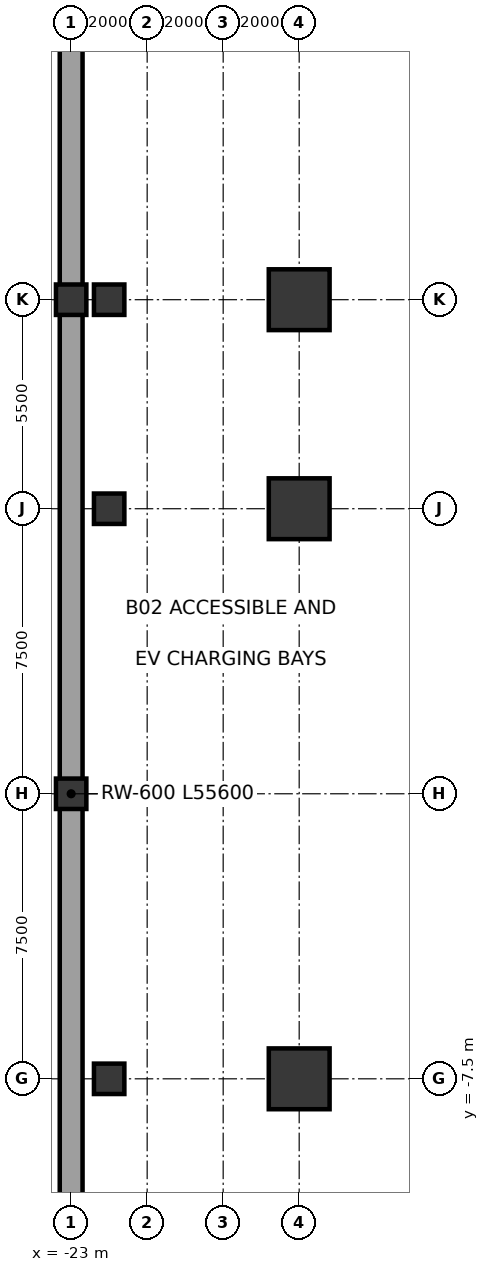
"""IFC4 building model, lengths in metres.
Left out: names, types, materials, properties, quantities, classifications, styles, units other than length and angle.
Written with IfcOpenShell. Run it as: python <this file> out.ifc"""

import sys

from ifc_helpers import new_model, si_unit, direction, frame, frame_2d, origin, origin_2d, place, context, subcontext, project, spatial, rectangle, extrude, element, save


model = new_model("IFC4")
c1 = context("Model", 3, precision=1e-05, world=origin(), true_north=direction((0.0, 1.0)))
c2 = subcontext(c1, "Body", "Model", "MODEL_VIEW")
j1 = project(units=[si_unit("LENGTHUNIT", "METRE"), si_unit("PLANEANGLEUNIT", "RADIAN")], contexts=[c1])
p1 = place(None, origin())
s1 = spatial("IfcSite", under=j1, at=p1, CompositionType="ELEMENT")
p2 = place(p1, origin())
s2 = spatial("IfcBuilding", under=s1, at=p2, CompositionType="ELEMENT")
p3 = place(p2, frame((0.0, 0.0, -7.2)))
s3 = spatial("IfcBuildingStorey", under=s2, at=p3, CompositionType="ELEMENT", Elevation=-7.2)
p4 = place(p3, frame((-23.0, 27.8, 0.0), z_axis=(0.0, 0.0, 1.0), x_axis=(0.0, -1.0, 0.0)))
e1 = element("IfcWall", 1, at=p4, inside=s3, PredefinedType="USERDEFINED", context=c2, shape_type="SweptSolid", body=[
    extrude(rectangle(XDim=55.6, YDim=0.6, at=frame_2d((27.8, 0.0))), origin(), (0.0, 0.0, 1.0), 3.6),
])
for number, where, z_axis, x_axis in (
    (2, (-17.0, 13.0, 0.0), (0.0, 0.0, 1.0), (1.0, 0.0, 0.0)),
    (3, (-17.0, 7.5, 0.0), (0.0, 0.0, 1.0), (1.0, 0.0, 0.0)),
    (4, (-17.0, -7.5, 0.0), (0.0, 0.0, 1.0), (1.0, 0.0, 0.0)),
):
    element("IfcColumn", number, at=place(p3, frame(where, z_axis=z_axis, x_axis=x_axis)), inside=s3, PredefinedType="USERDEFINED", context=c2, shape_type="SweptSolid", body=[
        extrude(rectangle(XDim=1.6, YDim=1.6, at=origin_2d()), origin(), (0.0, 0.0, 1.0), 3.6),
    ])
for number, where, z_axis, x_axis in (
    (5, (-23.0, 0.0, 0.0), (0.0, 0.0, 1.0), (1.0, 0.0, 0.0)),
    (6, (-23.0, 13.0, 0.0), (0.0, 0.0, 1.0), (1.0, 0.0, 0.0)),
    (7, (-22.0, -7.5, 0.0), (0.0, 0.0, 1.0), (1.0, 0.0, 0.0)),
    (8, (-22.0, 7.5, 0.0), (0.0, 0.0, 1.0), (1.0, 0.0, 0.0)),
    (9, (-22.0, 13.0, 0.0), (0.0, 0.0, 1.0), (1.0, 0.0, 0.0)),
):
    element("IfcColumn", number, at=place(p3, frame(where, z_axis=z_axis, x_axis=x_axis)), inside=s3, PredefinedType="COLUMN", context=c2, shape_type="SweptSolid", body=[
        extrude(rectangle(XDim=0.8, YDim=0.8, at=origin_2d()), origin(), (0.0, 0.0, 1.0), 3.6),
    ])
save(model, sys.argv[1])
